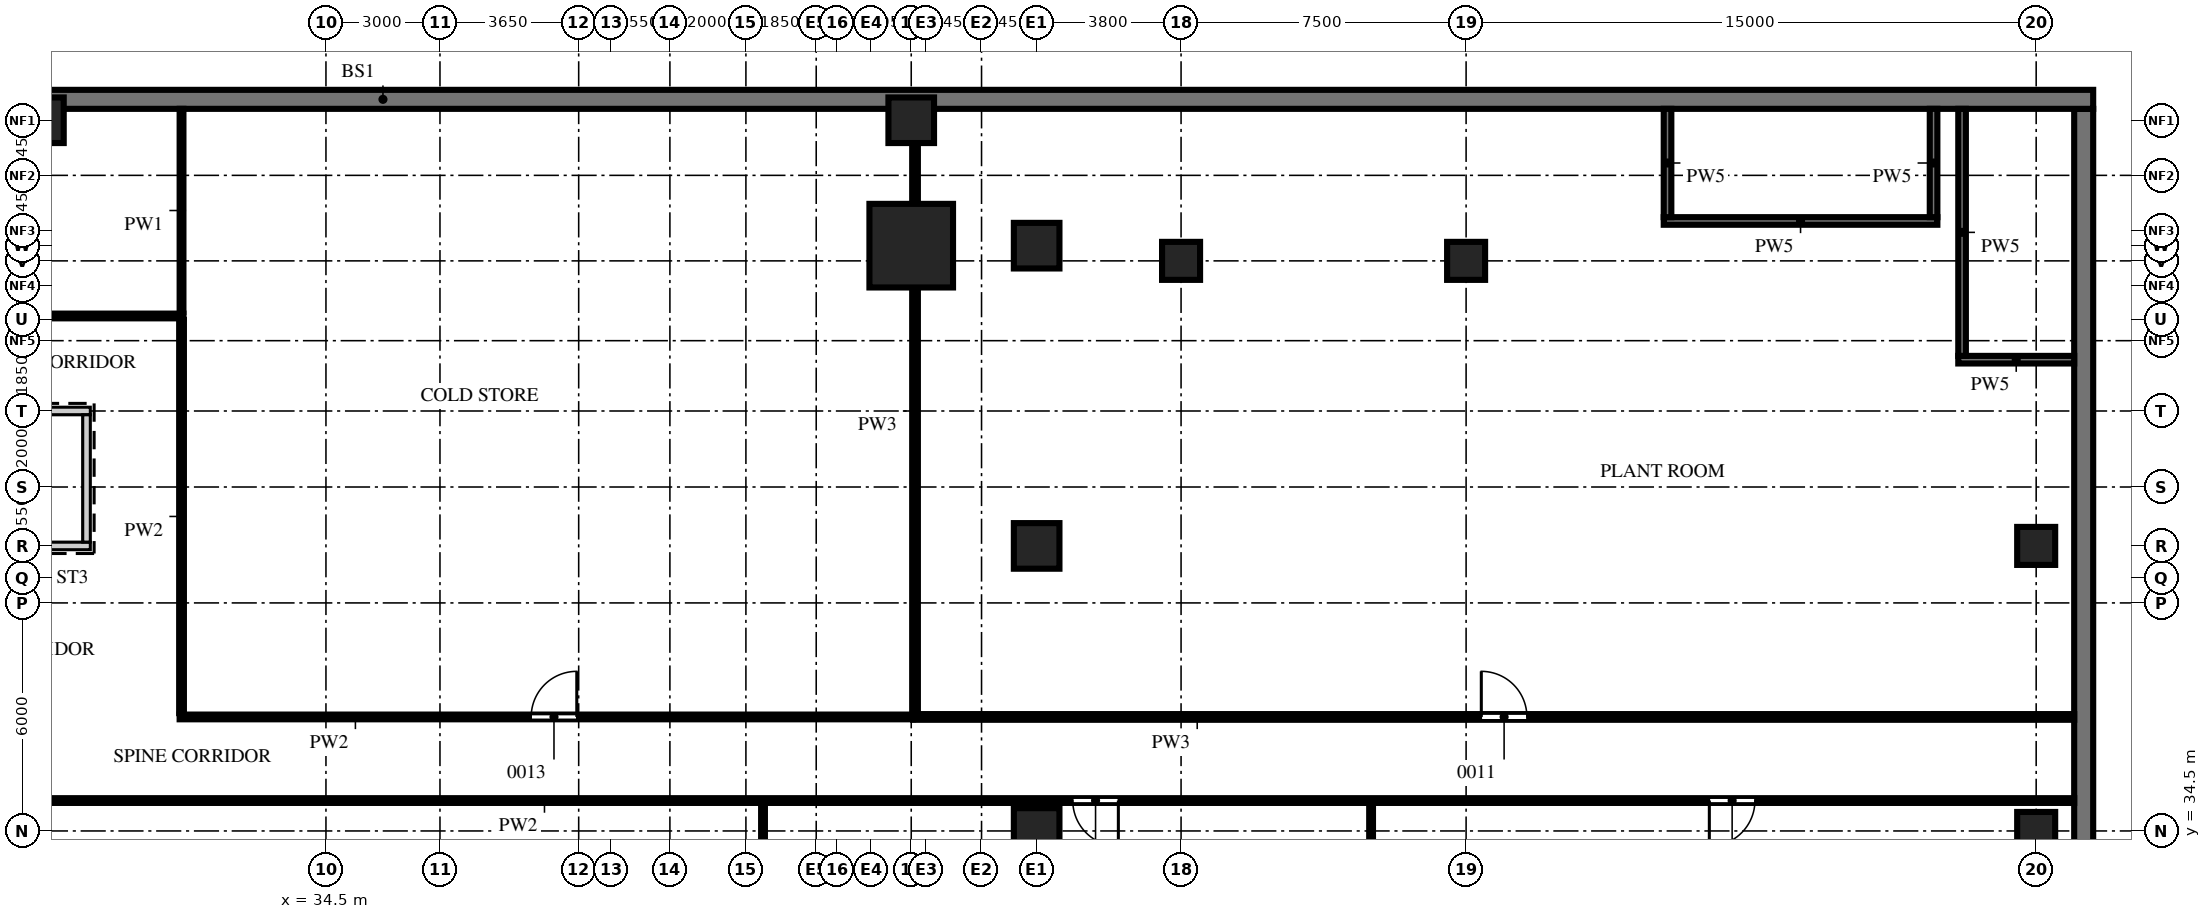
"""IFC4 building model, lengths in metres.
Left out: names, types, materials, properties, quantities, classifications, styles, units other than length and angle.
Written with IfcOpenShell. Run it as: python <this file> out.ifc"""

import sys

from ifc_helpers import new_model, si_unit, direction, frame, frame_2d, origin, origin_2d, place, context, subcontext, project, spatial, rectangle, extrude, source, transform, mapped, element, fill, save


model = new_model("IFC4")
c1 = context("Model", 3, precision=1e-05, world=origin(), true_north=direction((0.0, 1.0)))
c2 = subcontext(c1, "Body", "Model", "MODEL_VIEW")
j1 = project(units=[si_unit("LENGTHUNIT", "METRE"), si_unit("PLANEANGLEUNIT", "RADIAN")], contexts=[c1])
p1 = place(None, origin())
s1 = spatial("IfcSite", under=j1, at=p1, CompositionType="ELEMENT")
p2 = place(p1, origin())
s2 = spatial("IfcBuilding", under=s1, at=p2, CompositionType="ELEMENT")
p3 = place(p2, frame((0.0, 0.0, -4.5)))
s3 = spatial("IfcBuildingStorey", under=s2, at=p3, CompositionType="ELEMENT", Elevation=-4.5)
m1 = source(origin(), c2, "Body", "SweptSolid", [
    extrude(rectangle(XDim=7.1, YDim=0.2, at=frame_2d((3.55, 0.0))), origin(), (0.0, 0.0, 1.0), 4.15),
])
p4 = place(p3, frame((21.2, 45.55, 0.0), z_axis=(0.0, 0.0, 1.0), x_axis=(1.0, 0.0, 0.0)))
e1 = element("IfcWall", 1, at=p4, inside=s3, PredefinedType="SHEAR", context=c2, shape_type="MappedRepresentation", body=[
    mapped(m1, transform((0.0, 0.0, 0.0))),
])
m2 = source(origin(), c2, "Body", "SweptSolid", [
    extrude(rectangle(XDim=1.2, YDim=2.1, at=frame_2d((0.6, 1.05))), frame((0.0, 0.11, 0.0), z_axis=(0.0, -1.0, 0.0), x_axis=(1.0, 0.0, 0.0)), (0.0, 0.0, 1.0), 0.22),
])
p5 = place(p4, frame((0.15, 0.0, 0.0)))
e2 = element("IfcOpeningElement", 2, at=p5, cuts=e1, PredefinedType="OPENING", context=c2, shape_type="MappedRepresentation", body=[
    mapped(m2, transform((0.0, 0.0, 0.0))),
])
p6 = place(p3, frame((21.2, 42.0, 0.0), z_axis=(0.0, 0.0, 1.0), x_axis=(1.0, 0.0, 0.0)))
e3 = element("IfcWall", 3, at=p6, inside=s3, PredefinedType="SHEAR", context=c2, shape_type="MappedRepresentation", body=[
    mapped(m1, transform((0.0, 0.0, 0.0))),
])
m3 = source(origin(), c2, "Body", "SweptSolid", [
    extrude(rectangle(XDim=3.35, YDim=0.2, at=frame_2d((1.675, 0.0))), origin(), (0.0, 0.0, 1.0), 4.15),
])
p7 = place(p3, frame((28.2, 42.1, 0.0), z_axis=(0.0, 0.0, 1.0), x_axis=(0.0, 1.0, 0.0)))
e4 = element("IfcWall", 4, at=p7, inside=s3, PredefinedType="SHEAR", context=c2, shape_type="MappedRepresentation", body=[
    mapped(m3, transform((0.0, 0.0, 0.0))),
])
m4 = source(origin(), c2, "Body", "SweptSolid", [
    extrude(rectangle(XDim=53.0, YDim=0.5, at=frame_2d((26.5, 0.0))), origin(), (0.0, 0.0, 1.0), 4.15),
])
p8 = place(p3, frame((80.75, 0.5, 0.0), z_axis=(0.0, 0.0, 1.0), x_axis=(0.0, 1.0, 0.0)))
e5 = element("IfcWall", 5, at=p8, inside=s3, PredefinedType="STANDARD", context=c2, shape_type="MappedRepresentation", body=[
    mapped(m4, transform((0.0, 0.0, 0.0))),
])
m5 = source(origin(), c2, "Body", "SweptSolid", [
    extrude(rectangle(XDim=90.0, YDim=0.5, at=frame_2d((45.0, 0.0))), origin(), (0.0, 0.0, 1.0), 4.15),
])
p9 = place(p3, frame((-9.0, 53.75, 0.0), z_axis=(0.0, 0.0, 1.0), x_axis=(1.0, 0.0, 0.0)))
e6 = element("IfcWall", 6, at=p9, inside=s3, PredefinedType="STANDARD", context=c2, shape_type="MappedRepresentation", body=[
    mapped(m5, transform((0.0, 0.0, 0.0))),
])
m6 = source(origin(), c2, "Body", "SweptSolid", [
    extrude(rectangle(XDim=2.2, YDim=2.2, at=origin_2d()), origin(), (0.0, 0.0, 1.0), 4.5),
])
p10 = place(p3, frame((49.9, 49.9, 0.0), z_axis=(0.0, 0.0, 1.0), x_axis=(1.0, 0.0, 0.0)))
e7 = element("IfcColumn", 7, at=p10, inside=s3, PredefinedType="COLUMN", context=c2, shape_type="MappedRepresentation", body=[
    mapped(m6, transform((0.0, 0.0, 0.0))),
])
m7 = source(origin(), c2, "Body", "SweptSolid", [
    extrude(rectangle(XDim=1.2, YDim=1.2, at=origin_2d()), origin(), (0.0, 0.0, 1.0), 4.15),
])
for number, where, z_axis, x_axis in (
    (8, (53.2, 34.5, 0.0), (0.0, 0.0, 1.0), (1.0, 0.0, 0.0)),
    (9, (53.2, 42.0, 0.0), (0.0, 0.0, 1.0), (1.0, 0.0, 0.0)),
    (10, (53.2, 49.9, 0.0), (0.0, 0.0, 1.0), (1.0, 0.0, 0.0)),
    (11, (27.0, 53.2, 0.0), (0.0, 0.0, 1.0), (1.0, 0.0, 0.0)),
    (12, (49.9, 53.2, 0.0), (0.0, 0.0, 1.0), (1.0, 0.0, 0.0)),
):
    element("IfcColumn", number, at=place(p3, frame(where, z_axis=z_axis, x_axis=x_axis)), inside=s3, PredefinedType="COLUMN", context=c2, shape_type="MappedRepresentation", body=[
        mapped(m7, transform((0.0, 0.0, 0.0))),
    ])
m8 = source(origin(), c2, "Body", "SweptSolid", [
    extrude(rectangle(XDim=1.0, YDim=1.0, at=origin_2d()), origin(), (0.0, 0.0, 1.0), 4.15),
])
for number, where, z_axis, x_axis in (
    (13, (57.0, 49.5, 0.0), (0.0, 0.0, 1.0), (1.0, 0.0, 0.0)),
    (14, (64.5, 49.5, 0.0), (0.0, 0.0, 1.0), (1.0, 0.0, 0.0)),
    (15, (79.5, 34.5, 0.0), (0.0, 0.0, 1.0), (1.0, 0.0, 0.0)),
    (16, (79.5, 42.0, 0.0), (0.0, 0.0, 1.0), (1.0, 0.0, 0.0)),
):
    element("IfcColumn", number, at=place(p3, frame(where, z_axis=z_axis, x_axis=x_axis)), inside=s3, PredefinedType="COLUMN", context=c2, shape_type="MappedRepresentation", body=[
        mapped(m8, transform((0.0, 0.0, 0.0))),
    ])
m9 = source(origin(), c2, "Body", "SweptSolid", [
    extrude(rectangle(XDim=15.7, YDim=0.1, at=frame_2d((7.85, 0.0))), origin(), (0.0, 0.0, 1.0), 4.15),
])
for number, where, z_axis, x_axis in (
    (17, (46.0, 19.5, 0.0), (0.0, 0.0, 1.0), (0.0, 1.0, 0.0)),
    (18, (62.0, 19.5, 0.0), (0.0, 0.0, 1.0), (0.0, 1.0, 0.0)),
):
    element("IfcWall", number, at=place(p3, frame(where, z_axis=z_axis, x_axis=x_axis)), inside=s3, PredefinedType="PARTITIONING", context=c2, shape_type="MappedRepresentation", body=[
        mapped(m9, transform((0.0, 0.0, 0.0))),
    ])
m10 = source(origin(), c2, "Body", "SweptSolid", [
    extrude(rectangle(XDim=54.15, YDim=0.125, at=frame_2d((27.075, 0.0))), origin(), (0.0, 0.0, 1.0), 4.15),
])
p11 = place(p3, frame((26.35, 35.3, 0.0), z_axis=(0.0, 0.0, 1.0), x_axis=(1.0, 0.0, 0.0)))
e19 = element("IfcWall", 19, at=p11, inside=s3, PredefinedType="PARTITIONING", context=c2, shape_type="MappedRepresentation", body=[
    mapped(m10, transform((0.0, 0.0, 0.0))),
])
m11 = source(origin(), c2, "Body", "SweptSolid", [
    extrude(rectangle(XDim=1.2, YDim=2.1, at=frame_2d((0.6, 1.05))), frame((0.0, 0.073, 0.0), z_axis=(0.0, -1.0, 0.0), x_axis=(1.0, 0.0, 0.0)), (0.0, 0.0, 1.0), 0.145),
])
p12 = place(p11, frame((27.8, 0.0, 0.0)))
e20 = element("IfcOpeningElement", 20, at=p12, cuts=e19, PredefinedType="OPENING", context=c2, shape_type="MappedRepresentation", body=[
    mapped(m11, transform((0.0, 0.0, 0.0))),
])
p13 = place(p11, frame((44.55, 0.0, 0.0)))
e21 = element("IfcOpeningElement", 21, at=p13, cuts=e19, PredefinedType="OPENING", context=c2, shape_type="MappedRepresentation", body=[
    mapped(m11, transform((0.0, 0.0, 0.0))),
])
m12 = source(origin(), c2, "Body", "SweptSolid", [
    extrude(rectangle(XDim=19.3, YDim=0.125, at=frame_2d((9.65, 0.0))), origin(), (0.0, 0.0, 1.0), 4.15),
])
p14 = place(p3, frame((30.65, 37.5, 0.0), z_axis=(0.0, 0.0, 1.0), x_axis=(1.0, 0.0, 0.0)))
e22 = element("IfcWall", 22, at=p14, inside=s3, PredefinedType="PARTITIONING", context=c2, shape_type="MappedRepresentation", body=[
    mapped(m12, transform((0.0, 0.0, 0.0))),
])
p15 = place(p14, frame((9.25, 0.0, 0.0)))
e23 = element("IfcOpeningElement", 23, at=p15, cuts=e22, PredefinedType="OPENING", context=c2, shape_type="MappedRepresentation", body=[
    mapped(m11, transform((0.0, 0.0, 0.0))),
])
m13 = source(origin(), c2, "Body", "SweptSolid", [
    extrude(rectangle(XDim=30.55, YDim=0.15, at=frame_2d((15.275, 0.0))), origin(), (0.0, 0.0, 1.0), 4.15),
])
p16 = place(p3, frame((49.95, 37.5, 0.0), z_axis=(0.0, 0.0, 1.0), x_axis=(1.0, 0.0, 0.0)))
e24 = element("IfcWall", 24, at=p16, inside=s3, PredefinedType="PARTITIONING", context=c2, shape_type="MappedRepresentation", body=[
    mapped(m13, transform((0.0, 0.0, 0.0))),
])
m14 = source(origin(), c2, "Body", "SweptSolid", [
    extrude(rectangle(XDim=1.2, YDim=2.1, at=frame_2d((0.6, 1.05))), frame((0.0, 0.085, 0.0), z_axis=(0.0, -1.0, 0.0), x_axis=(1.0, 0.0, 0.0)), (0.0, 0.0, 1.0), 0.17),
])
p17 = place(p16, frame((14.95, 0.0, 0.0)))
e25 = element("IfcOpeningElement", 25, at=p17, cuts=e24, PredefinedType="OPENING", context=c2, shape_type="MappedRepresentation", body=[
    mapped(m14, transform((0.0, 0.0, 0.0))),
])
m15 = source(origin(), c2, "Body", "SweptSolid", [
    extrude(rectangle(XDim=10.35, YDim=0.125, at=frame_2d((5.175, 0.0))), origin(), (0.0, 0.0, 1.0), 4.15),
])
p18 = place(p3, frame((30.7, 37.6, 0.0), z_axis=(0.0, 0.0, 1.0), x_axis=(0.0, 1.0, 0.0)))
e26 = element("IfcWall", 26, at=p18, inside=s3, PredefinedType="PARTITIONING", context=c2, shape_type="MappedRepresentation", body=[
    mapped(m15, transform((0.0, 0.0, 0.0))),
])
m16 = source(origin(), c2, "Body", "SweptSolid", [
    extrude(rectangle(XDim=15.9, YDim=0.15, at=frame_2d((7.95, 0.0))), origin(), (0.0, 0.0, 1.0), 4.15),
])
p19 = place(p3, frame((50.0, 37.6, 0.0), z_axis=(0.0, 0.0, 1.0), x_axis=(0.0, 1.0, 0.0)))
e27 = element("IfcWall", 27, at=p19, inside=s3, PredefinedType="PARTITIONING", context=c2, shape_type="MappedRepresentation", body=[
    mapped(m16, transform((0.0, 0.0, 0.0))),
])
m17 = source(origin(), c2, "Body", "SweptSolid", [
    extrude(rectangle(XDim=18.8, YDim=0.125, at=frame_2d((9.4, 0.0))), origin(), (0.0, 0.0, 1.0), 4.15),
])
p20 = place(p3, frame((11.95, 48.05, 0.0), z_axis=(0.0, 0.0, 1.0), x_axis=(1.0, 0.0, 0.0)))
e28 = element("IfcWall", 28, at=p20, inside=s3, PredefinedType="PARTITIONING", context=c2, shape_type="MappedRepresentation", body=[
    mapped(m17, transform((0.0, 0.0, 0.0))),
])
m18 = source(origin(), c2, "Body", "SweptSolid", [
    extrude(rectangle(XDim=0.9, YDim=2.1, at=frame_2d((0.45, 1.05))), frame((0.0, 0.073, 0.0), z_axis=(0.0, -1.0, 0.0), x_axis=(1.0, 0.0, 0.0)), (0.0, 0.0, 1.0), 0.145),
])
p21 = place(p20, frame((8.95, 0.0, 0.0)))
e29 = element("IfcOpeningElement", 29, at=p21, cuts=e28, PredefinedType="OPENING", context=c2, shape_type="MappedRepresentation", body=[
    mapped(m18, transform((0.0, 0.0, 0.0))),
])
m19 = source(origin(), c2, "Body", "SweptSolid", [
    extrude(rectangle(XDim=5.35, YDim=0.1, at=frame_2d((2.675, 0.0))), origin(), (0.0, 0.0, 1.0), 4.15),
])
p22 = place(p3, frame((30.7, 48.15, 0.0), z_axis=(0.0, 0.0, 1.0), x_axis=(0.0, 1.0, 0.0)))
e30 = element("IfcWall", 30, at=p22, inside=s3, PredefinedType="PARTITIONING", context=c2, shape_type="MappedRepresentation", body=[
    mapped(m19, transform((0.0, 0.0, 0.0))),
])
m20 = source(origin(), c2, "Body", "SweptSolid", [
    extrude(rectangle(XDim=7.2, YDim=0.2, at=frame_2d((3.6, 0.0))), origin(), (0.0, 0.0, 1.0), 4.15),
])
p23 = place(p3, frame((69.7, 50.55, 0.0), z_axis=(0.0, 0.0, 1.0), x_axis=(1.0, 0.0, 0.0)))
e31 = element("IfcWall", 31, at=p23, inside=s3, PredefinedType="PARTITIONING", context=c2, shape_type="MappedRepresentation", body=[
    mapped(m20, transform((0.0, 0.0, 0.0))),
])
m21 = source(origin(), c2, "Body", "SweptSolid", [
    extrude(rectangle(XDim=2.85, YDim=0.2, at=frame_2d((1.425, 0.0))), origin(), (0.0, 0.0, 1.0), 4.15),
])
for number, where, z_axis, x_axis in (
    (32, (69.8, 50.65, 0.0), (0.0, 0.0, 1.0), (0.0, 1.0, 0.0)),
    (33, (76.8, 50.65, 0.0), (0.0, 0.0, 1.0), (0.0, 1.0, 0.0)),
):
    element("IfcWall", number, at=place(p3, frame(where, z_axis=z_axis, x_axis=x_axis)), inside=s3, PredefinedType="PARTITIONING", context=c2, shape_type="MappedRepresentation", body=[
        mapped(m21, transform((0.0, 0.0, 0.0))),
    ])
m22 = source(origin(), c2, "Body", "SweptSolid", [
    extrude(rectangle(XDim=3.05, YDim=0.2, at=frame_2d((1.525, 0.0))), origin(), (0.0, 0.0, 1.0), 4.15),
])
p24 = place(p3, frame((77.45, 46.9, 0.0), z_axis=(0.0, 0.0, 1.0), x_axis=(1.0, 0.0, 0.0)))
e34 = element("IfcWall", 34, at=p24, inside=s3, PredefinedType="PARTITIONING", context=c2, shape_type="MappedRepresentation", body=[
    mapped(m22, transform((0.0, 0.0, 0.0))),
])
m23 = source(origin(), c2, "Body", "SweptSolid", [
    extrude(rectangle(XDim=6.5, YDim=0.2, at=frame_2d((3.25, 0.0))), origin(), (0.0, 0.0, 1.0), 4.15),
])
p25 = place(p3, frame((77.55, 47.0, 0.0), z_axis=(0.0, 0.0, 1.0), x_axis=(0.0, 1.0, 0.0)))
e35 = element("IfcWall", 35, at=p25, inside=s3, PredefinedType="PARTITIONING", context=c2, shape_type="MappedRepresentation", body=[
    mapped(m23, transform((0.0, 0.0, 0.0))),
])
m24 = source(origin(), c2, "Body", "SweptSolid", [
    extrude(rectangle(XDim=1.2, YDim=2.1, at=frame_2d((0.6, 1.05))), frame((0.0, 0.025, 0.0), z_axis=(0.0, -1.0, 0.0), x_axis=(1.0, 0.0, 0.0)), (0.0, 0.0, 1.0), 0.05),
])
p26 = place(p12, origin())
e36 = element("IfcDoor", 36, at=p26, inside=s3, OperationType="SINGLE_SWING_RIGHT", PredefinedType="DOOR", context=c2, shape_type="MappedRepresentation", body=[
    mapped(m24, transform((0.0, 0.0, 0.0))),
])
fill(e20, e36)
p27 = place(p13, origin())
e37 = element("IfcDoor", 37, at=p27, inside=s3, OperationType="SINGLE_SWING_LEFT", PredefinedType="DOOR", context=c2, shape_type="MappedRepresentation", body=[
    mapped(m24, transform((0.0, 0.0, 0.0))),
])
fill(e21, e37)
p28 = place(p15, origin())
e38 = element("IfcDoor", 38, at=p28, inside=s3, OperationType="SINGLE_SWING_LEFT", PredefinedType="DOOR", context=c2, shape_type="MappedRepresentation", body=[
    mapped(m24, transform((0.0, 0.0, 0.0))),
])
fill(e23, e38)
p29 = place(p17, origin())
e39 = element("IfcDoor", 39, at=p29, inside=s3, OperationType="SINGLE_SWING_RIGHT", PredefinedType="DOOR", context=c2, shape_type="MappedRepresentation", body=[
    mapped(m24, transform((0.0, 0.0, 0.0))),
])
fill(e25, e39)
save(model, sys.argv[1])
